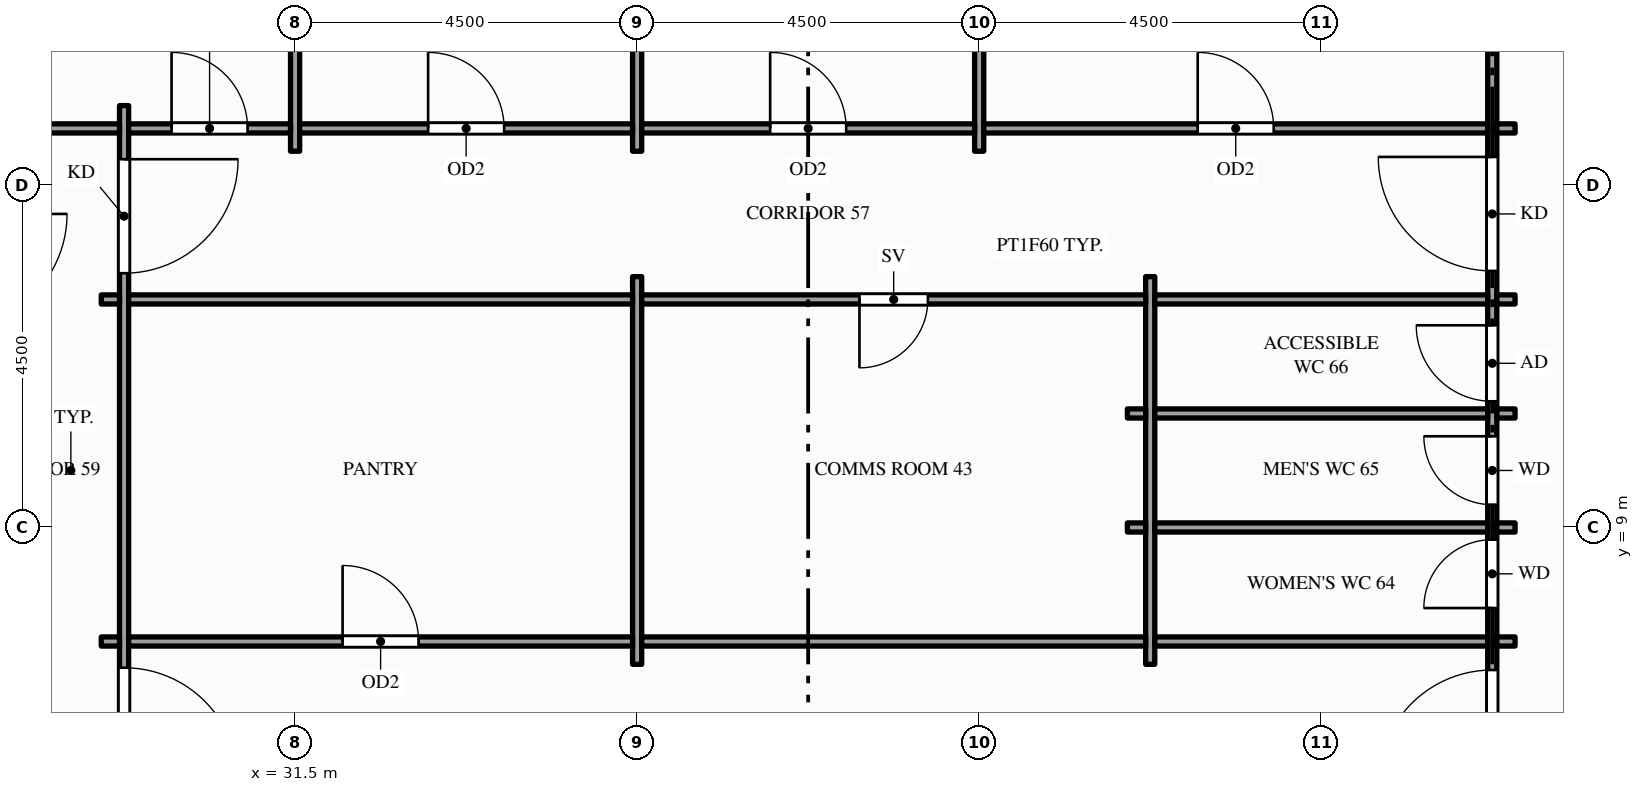
"""IFC4 building model, lengths in metres.
Left out: names, types, materials, properties, quantities, classifications, styles, units other than length and angle.
Written with IfcOpenShell. Run it as: python <this file> out.ifc"""

import sys

from ifc_helpers import new_model, si_unit, direction, frame, frame_2d, origin, place, context, subcontext, project, spatial, rectangle, extrude, element, fill, save


model = new_model("IFC4")
c1 = context("Model", 3, precision=1e-05, world=origin(), true_north=direction((0.0, 1.0)))
c2 = subcontext(c1, "Body", "Model", "MODEL_VIEW")
j1 = project(units=[si_unit("LENGTHUNIT", "METRE"), si_unit("PLANEANGLEUNIT", "RADIAN")], contexts=[c1])
p1 = place(None, origin())
s1 = spatial("IfcSite", under=j1, at=p1, CompositionType="ELEMENT")
p2 = place(p1, origin())
s2 = spatial("IfcBuilding", under=s1, at=p2, CompositionType="ELEMENT")
p3 = place(p2, frame((0.0, 0.0, 211.0)))
s3 = spatial("IfcBuildingStorey", under=s2, at=p3, CompositionType="ELEMENT", Elevation=211.0)
p4 = place(p3, frame((29.25, 4.95, 0.0), z_axis=(0.0, 0.0, 1.0), x_axis=(0.0, 1.0, 0.0)))
e1 = element("IfcWall", 1, at=p4, inside=s3, PredefinedType="PARTITIONING", context=c2, shape_type="SweptSolid", body=[
    extrude(rectangle(XDim=9.6, YDim=0.12, at=frame_2d((4.8, 0.0))), origin(), (0.0, 0.0, 1.0), 2.87),
])
p5 = place(p4, frame((0.705, 0.0, 0.0)))
e2 = element("IfcOpeningElement", 2, at=p5, cuts=e1, PredefinedType="OPENING", context=c2, shape_type="SweptSolid", body=[
    extrude(rectangle(XDim=1.5, YDim=2.1, at=frame_2d((0.75, 1.05))), frame((0.0, 0.07, 0.0), z_axis=(0.0, -1.0, 0.0), x_axis=(1.0, 0.0, 0.0)), (0.0, 0.0, 1.0), 0.14),
])
p6 = place(p4, frame((7.395, 0.0, 0.0)))
e3 = element("IfcOpeningElement", 3, at=p6, cuts=e1, PredefinedType="OPENING", context=c2, shape_type="SweptSolid", body=[
    extrude(rectangle(XDim=1.5, YDim=2.1, at=frame_2d((0.75, 1.05))), frame((0.0, 0.07, 0.0), z_axis=(0.0, -1.0, 0.0), x_axis=(1.0, 0.0, 0.0)), (0.0, 0.0, 1.0), 0.14),
])
p7 = place(p3, frame((31.5, 13.95, 0.0), z_axis=(0.0, 0.0, 1.0), x_axis=(0.0, 1.0, 0.0)))
e4 = element("IfcWall", 4, at=p7, inside=s3, PredefinedType="PARTITIONING", context=c2, shape_type="SweptSolid", body=[
    extrude(rectangle(XDim=6.9, YDim=0.12, at=frame_2d((3.45, 0.0))), origin(), (0.0, 0.0, 1.0), 2.87),
])
p8 = place(p3, frame((36.0, 7.2, 0.0), z_axis=(0.0, 0.0, 1.0), x_axis=(0.0, 1.0, 0.0)))
e5 = element("IfcWall", 5, at=p8, inside=s3, PredefinedType="PARTITIONING", context=c2, shape_type="SweptSolid", body=[
    extrude(rectangle(XDim=5.1, YDim=0.12, at=frame_2d((2.55, 0.0))), origin(), (0.0, 0.0, 1.0), 2.87),
])
for number, where, z_axis, x_axis in (
    (6, (36.0, 13.95, 0.0), (0.0, 0.0, 1.0), (0.0, 1.0, 0.0)),
    (7, (40.5, 13.95, 0.0), (0.0, 0.0, 1.0), (0.0, 1.0, 0.0)),
):
    element("IfcWall", number, at=place(p3, frame(where, z_axis=z_axis, x_axis=x_axis)), inside=s3, PredefinedType="PARTITIONING", context=c2, shape_type="SweptSolid", body=[
        extrude(rectangle(XDim=6.9, YDim=0.12, at=frame_2d((3.45, 0.0))), origin(), (0.0, 0.0, 1.0), 2.87),
    ])
p9 = place(p3, frame((42.75, 7.2, 0.0), z_axis=(0.0, 0.0, 1.0), x_axis=(0.0, 1.0, 0.0)))
e8 = element("IfcWall", 8, at=p9, inside=s3, PredefinedType="PARTITIONING", context=c2, shape_type="SweptSolid", body=[
    extrude(rectangle(XDim=5.1, YDim=0.12, at=frame_2d((2.55, 0.0))), origin(), (0.0, 0.0, 1.0), 2.87),
])
p10 = place(p3, frame((47.25, -1.35, 0.0), z_axis=(0.0, 0.0, 1.0), x_axis=(0.0, 1.0, 0.0)))
e9 = element("IfcWall", 9, at=p10, inside=s3, PredefinedType="PARTITIONING", context=c2, shape_type="SweptSolid", body=[
    extrude(rectangle(XDim=22.2, YDim=0.12, at=frame_2d((11.1, 0.0))), origin(), (0.0, 0.0, 1.0), 2.87),
])
p11 = place(p10, frame((6.975, 0.0, 0.0)))
e10 = element("IfcOpeningElement", 10, at=p11, cuts=e9, PredefinedType="OPENING", context=c2, shape_type="SweptSolid", body=[
    extrude(rectangle(XDim=1.5, YDim=2.1, at=frame_2d((0.75, 1.05))), frame((0.0, 0.07, 0.0), z_axis=(0.0, -1.0, 0.0), x_axis=(1.0, 0.0, 0.0)), (0.0, 0.0, 1.0), 0.14),
])
p12 = place(p10, frame((13.725, 0.0, 0.0)))
e11 = element("IfcOpeningElement", 11, at=p12, cuts=e9, PredefinedType="OPENING", context=c2, shape_type="SweptSolid", body=[
    extrude(rectangle(XDim=1.5, YDim=2.1, at=frame_2d((0.75, 1.05))), frame((0.0, 0.07, 0.0), z_axis=(0.0, -1.0, 0.0), x_axis=(1.0, 0.0, 0.0)), (0.0, 0.0, 1.0), 0.14),
])
p13 = place(p10, frame((9.29, 0.0, 0.0)))
e12 = element("IfcOpeningElement", 12, at=p13, cuts=e9, PredefinedType="OPENING", context=c2, shape_type="SweptSolid", body=[
    extrude(rectangle(XDim=0.9, YDim=2.1, at=frame_2d((0.45, 1.05))), frame((0.0, 0.07, 0.0), z_axis=(0.0, -1.0, 0.0), x_axis=(1.0, 0.0, 0.0)), (0.0, 0.0, 1.0), 0.14),
])
p14 = place(p10, frame((10.65, 0.0, 0.0)))
e13 = element("IfcOpeningElement", 13, at=p14, cuts=e9, PredefinedType="OPENING", context=c2, shape_type="SweptSolid", body=[
    extrude(rectangle(XDim=0.9, YDim=2.1, at=frame_2d((0.45, 1.05))), frame((0.0, 0.07, 0.0), z_axis=(0.0, -1.0, 0.0), x_axis=(1.0, 0.0, 0.0)), (0.0, 0.0, 1.0), 0.14),
])
p15 = place(p10, frame((12.01, 0.0, 0.0)))
e14 = element("IfcOpeningElement", 14, at=p15, cuts=e9, PredefinedType="OPENING", context=c2, shape_type="SweptSolid", body=[
    extrude(rectangle(XDim=1.0, YDim=2.1, at=frame_2d((0.5, 1.05))), frame((0.0, 0.07, 0.0), z_axis=(0.0, -1.0, 0.0), x_axis=(1.0, 0.0, 0.0)), (0.0, 0.0, 1.0), 0.14),
])
p16 = place(p3, frame((28.95, 7.5, 0.0), z_axis=(0.0, 0.0, 1.0), x_axis=(1.0, 0.0, 0.0)))
e15 = element("IfcWall", 15, at=p16, inside=s3, PredefinedType="PARTITIONING", context=c2, shape_type="SweptSolid", body=[
    extrude(rectangle(XDim=0.24, YDim=0.12, at=frame_2d((0.12, 0.0))), origin(), (0.0, 0.0, 1.0), 2.87),
])
p17 = place(p3, frame((29.31, 7.5, 0.0), z_axis=(0.0, 0.0, 1.0), x_axis=(1.0, 0.0, 0.0)))
e16 = element("IfcWall", 16, at=p17, inside=s3, PredefinedType="PARTITIONING", context=c2, shape_type="SweptSolid", body=[
    extrude(rectangle(XDim=6.63, YDim=0.12, at=frame_2d((3.315, 0.0))), origin(), (0.0, 0.0, 1.0), 2.87),
])
p18 = place(p17, frame((2.815, 0.0, 0.0)))
e17 = element("IfcOpeningElement", 17, at=p18, cuts=e16, PredefinedType="OPENING", context=c2, shape_type="SweptSolid", body=[
    extrude(rectangle(XDim=1.0, YDim=2.1, at=frame_2d((0.5, 1.05))), frame((0.0, 0.07, 0.0), z_axis=(0.0, -1.0, 0.0), x_axis=(1.0, 0.0, 0.0)), (0.0, 0.0, 1.0), 0.14),
])
p19 = place(p3, frame((36.06, 7.5, 0.0), z_axis=(0.0, 0.0, 1.0), x_axis=(1.0, 0.0, 0.0)))
e18 = element("IfcWall", 18, at=p19, inside=s3, PredefinedType="PARTITIONING", context=c2, shape_type="SweptSolid", body=[
    extrude(rectangle(XDim=6.63, YDim=0.12, at=frame_2d((3.315, 0.0))), origin(), (0.0, 0.0, 1.0), 2.87),
])
p20 = place(p3, frame((42.81, 7.5, 0.0), z_axis=(0.0, 0.0, 1.0), x_axis=(1.0, 0.0, 0.0)))
e19 = element("IfcWall", 19, at=p20, inside=s3, PredefinedType="PARTITIONING", context=c2, shape_type="SweptSolid", body=[
    extrude(rectangle(XDim=4.38, YDim=0.12, at=frame_2d((2.19, 0.0))), origin(), (0.0, 0.0, 1.0), 2.87),
])
for number, where, z_axis, x_axis in (
    (20, (47.31, 7.5, 0.0), (0.0, 0.0, 1.0), (1.0, 0.0, 0.0)),
    (21, (42.45, 9.0, 0.0), (0.0, 0.0, 1.0), (1.0, 0.0, 0.0)),
):
    element("IfcWall", number, at=place(p3, frame(where, z_axis=z_axis, x_axis=x_axis)), inside=s3, PredefinedType="PARTITIONING", context=c2, shape_type="SweptSolid", body=[
        extrude(rectangle(XDim=0.24, YDim=0.12, at=frame_2d((0.12, 0.0))), origin(), (0.0, 0.0, 1.0), 2.87),
    ])
p21 = place(p3, frame((42.81, 9.0, 0.0), z_axis=(0.0, 0.0, 1.0), x_axis=(1.0, 0.0, 0.0)))
e22 = element("IfcWall", 22, at=p21, inside=s3, PredefinedType="PARTITIONING", context=c2, shape_type="SweptSolid", body=[
    extrude(rectangle(XDim=4.38, YDim=0.12, at=frame_2d((2.19, 0.0))), origin(), (0.0, 0.0, 1.0), 2.87),
])
for number, where, z_axis, x_axis in (
    (23, (47.31, 9.0, 0.0), (0.0, 0.0, 1.0), (1.0, 0.0, 0.0)),
    (24, (42.45, 10.5, 0.0), (0.0, 0.0, 1.0), (1.0, 0.0, 0.0)),
):
    element("IfcWall", number, at=place(p3, frame(where, z_axis=z_axis, x_axis=x_axis)), inside=s3, PredefinedType="PARTITIONING", context=c2, shape_type="SweptSolid", body=[
        extrude(rectangle(XDim=0.24, YDim=0.12, at=frame_2d((0.12, 0.0))), origin(), (0.0, 0.0, 1.0), 2.87),
    ])
p22 = place(p3, frame((42.81, 10.5, 0.0), z_axis=(0.0, 0.0, 1.0), x_axis=(1.0, 0.0, 0.0)))
e25 = element("IfcWall", 25, at=p22, inside=s3, PredefinedType="PARTITIONING", context=c2, shape_type="SweptSolid", body=[
    extrude(rectangle(XDim=4.38, YDim=0.12, at=frame_2d((2.19, 0.0))), origin(), (0.0, 0.0, 1.0), 2.87),
])
for number, where, z_axis, x_axis in (
    (26, (47.31, 10.5, 0.0), (0.0, 0.0, 1.0), (1.0, 0.0, 0.0)),
    (27, (28.95, 12.0, 0.0), (0.0, 0.0, 1.0), (1.0, 0.0, 0.0)),
):
    element("IfcWall", number, at=place(p3, frame(where, z_axis=z_axis, x_axis=x_axis)), inside=s3, PredefinedType="PARTITIONING", context=c2, shape_type="SweptSolid", body=[
        extrude(rectangle(XDim=0.24, YDim=0.12, at=frame_2d((0.12, 0.0))), origin(), (0.0, 0.0, 1.0), 2.87),
    ])
p23 = place(p3, frame((29.31, 12.0, 0.0), z_axis=(0.0, 0.0, 1.0), x_axis=(1.0, 0.0, 0.0)))
e28 = element("IfcWall", 28, at=p23, inside=s3, PredefinedType="PARTITIONING", context=c2, shape_type="SweptSolid", body=[
    extrude(rectangle(XDim=6.63, YDim=0.12, at=frame_2d((3.315, 0.0))), origin(), (0.0, 0.0, 1.0), 2.87),
])
p24 = place(p3, frame((36.06, 12.0, 0.0), z_axis=(0.0, 0.0, 1.0), x_axis=(1.0, 0.0, 0.0)))
e29 = element("IfcWall", 29, at=p24, inside=s3, PredefinedType="PARTITIONING", context=c2, shape_type="SweptSolid", body=[
    extrude(rectangle(XDim=6.63, YDim=0.12, at=frame_2d((3.315, 0.0))), origin(), (0.0, 0.0, 1.0), 2.87),
])
p25 = place(p24, frame((2.865, 0.0, 0.0)))
e30 = element("IfcOpeningElement", 30, at=p25, cuts=e29, PredefinedType="OPENING", context=c2, shape_type="SweptSolid", body=[
    extrude(rectangle(XDim=0.9, YDim=2.1, at=frame_2d((0.45, 1.05))), frame((0.0, 0.07, 0.0), z_axis=(0.0, -1.0, 0.0), x_axis=(1.0, 0.0, 0.0)), (0.0, 0.0, 1.0), 0.14),
])
p26 = place(p3, frame((42.81, 12.0, 0.0), z_axis=(0.0, 0.0, 1.0), x_axis=(1.0, 0.0, 0.0)))
e31 = element("IfcWall", 31, at=p26, inside=s3, PredefinedType="PARTITIONING", context=c2, shape_type="SweptSolid", body=[
    extrude(rectangle(XDim=4.38, YDim=0.12, at=frame_2d((2.19, 0.0))), origin(), (0.0, 0.0, 1.0), 2.87),
])
p27 = place(p3, frame((47.31, 12.0, 0.0), z_axis=(0.0, 0.0, 1.0), x_axis=(1.0, 0.0, 0.0)))
e32 = element("IfcWall", 32, at=p27, inside=s3, PredefinedType="PARTITIONING", context=c2, shape_type="SweptSolid", body=[
    extrude(rectangle(XDim=0.24, YDim=0.12, at=frame_2d((0.12, 0.0))), origin(), (0.0, 0.0, 1.0), 2.87),
])
p28 = place(p3, frame((27.06, 14.25, 0.0), z_axis=(0.0, 0.0, 1.0), x_axis=(1.0, 0.0, 0.0)))
e33 = element("IfcWall", 33, at=p28, inside=s3, PredefinedType="PARTITIONING", context=c2, shape_type="SweptSolid", body=[
    extrude(rectangle(XDim=2.13, YDim=0.12, at=frame_2d((1.065, 0.0))), origin(), (0.0, 0.0, 1.0), 2.87),
])
p29 = place(p3, frame((29.31, 14.25, 0.0), z_axis=(0.0, 0.0, 1.0), x_axis=(1.0, 0.0, 0.0)))
e34 = element("IfcWall", 34, at=p29, inside=s3, PredefinedType="PARTITIONING", context=c2, shape_type="SweptSolid", body=[
    extrude(rectangle(XDim=2.13, YDim=0.12, at=frame_2d((1.065, 0.0))), origin(), (0.0, 0.0, 1.0), 2.87),
])
p30 = place(p29, frame((0.565, 0.0, 0.0)))
e35 = element("IfcOpeningElement", 35, at=p30, cuts=e34, PredefinedType="OPENING", context=c2, shape_type="SweptSolid", body=[
    extrude(rectangle(XDim=1.0, YDim=2.1, at=frame_2d((0.5, 1.05))), frame((0.0, 0.07, 0.0), z_axis=(0.0, -1.0, 0.0), x_axis=(1.0, 0.0, 0.0)), (0.0, 0.0, 1.0), 0.14),
])
p31 = place(p3, frame((31.56, 14.25, 0.0), z_axis=(0.0, 0.0, 1.0), x_axis=(1.0, 0.0, 0.0)))
e36 = element("IfcWall", 36, at=p31, inside=s3, PredefinedType="PARTITIONING", context=c2, shape_type="SweptSolid", body=[
    extrude(rectangle(XDim=4.38, YDim=0.12, at=frame_2d((2.19, 0.0))), origin(), (0.0, 0.0, 1.0), 2.87),
])
p32 = place(p31, frame((1.69, 0.0, 0.0)))
e37 = element("IfcOpeningElement", 37, at=p32, cuts=e36, PredefinedType="OPENING", context=c2, shape_type="SweptSolid", body=[
    extrude(rectangle(XDim=1.0, YDim=2.1, at=frame_2d((0.5, 1.05))), frame((0.0, 0.07, 0.0), z_axis=(0.0, -1.0, 0.0), x_axis=(1.0, 0.0, 0.0)), (0.0, 0.0, 1.0), 0.14),
])
p33 = place(p3, frame((36.06, 14.25, 0.0), z_axis=(0.0, 0.0, 1.0), x_axis=(1.0, 0.0, 0.0)))
e38 = element("IfcWall", 38, at=p33, inside=s3, PredefinedType="PARTITIONING", context=c2, shape_type="SweptSolid", body=[
    extrude(rectangle(XDim=4.38, YDim=0.12, at=frame_2d((2.19, 0.0))), origin(), (0.0, 0.0, 1.0), 2.87),
])
p34 = place(p33, frame((1.69, 0.0, 0.0)))
e39 = element("IfcOpeningElement", 39, at=p34, cuts=e38, PredefinedType="OPENING", context=c2, shape_type="SweptSolid", body=[
    extrude(rectangle(XDim=1.0, YDim=2.1, at=frame_2d((0.5, 1.05))), frame((0.0, 0.07, 0.0), z_axis=(0.0, -1.0, 0.0), x_axis=(1.0, 0.0, 0.0)), (0.0, 0.0, 1.0), 0.14),
])
p35 = place(p3, frame((40.56, 14.25, 0.0), z_axis=(0.0, 0.0, 1.0), x_axis=(1.0, 0.0, 0.0)))
e40 = element("IfcWall", 40, at=p35, inside=s3, PredefinedType="PARTITIONING", context=c2, shape_type="SweptSolid", body=[
    extrude(rectangle(XDim=6.63, YDim=0.12, at=frame_2d((3.315, 0.0))), origin(), (0.0, 0.0, 1.0), 2.87),
])
p36 = place(p35, frame((2.815, 0.0, 0.0)))
e41 = element("IfcOpeningElement", 41, at=p36, cuts=e40, PredefinedType="OPENING", context=c2, shape_type="SweptSolid", body=[
    extrude(rectangle(XDim=1.0, YDim=2.1, at=frame_2d((0.5, 1.05))), frame((0.0, 0.07, 0.0), z_axis=(0.0, -1.0, 0.0), x_axis=(1.0, 0.0, 0.0)), (0.0, 0.0, 1.0), 0.14),
])
p37 = place(p3, frame((47.31, 14.25, 0.0), z_axis=(0.0, 0.0, 1.0), x_axis=(1.0, 0.0, 0.0)))
e42 = element("IfcWall", 42, at=p37, inside=s3, PredefinedType="PARTITIONING", context=c2, shape_type="SweptSolid", body=[
    extrude(rectangle(XDim=0.24, YDim=0.12, at=frame_2d((0.12, 0.0))), origin(), (0.0, 0.0, 1.0), 2.87),
])
p38 = place(p5, origin())
e43 = element("IfcDoor", 43, at=p38, inside=s3, OperationType="SINGLE_SWING_LEFT", PredefinedType="DOOR", context=c2, shape_type="SweptSolid", body=[
    extrude(rectangle(XDim=1.5, YDim=2.1, at=frame_2d((0.75, 1.05))), frame((0.0, 0.025, 0.0), z_axis=(0.0, -1.0, 0.0), x_axis=(1.0, 0.0, 0.0)), (0.0, 0.0, 1.0), 0.05),
])
fill(e2, e43)
p39 = place(p6, origin())
e44 = element("IfcDoor", 44, at=p39, inside=s3, OperationType="SINGLE_SWING_RIGHT", PredefinedType="DOOR", context=c2, shape_type="SweptSolid", body=[
    extrude(rectangle(XDim=1.5, YDim=2.1, at=frame_2d((0.75, 1.05))), frame((0.0, 0.025, 0.0), z_axis=(0.0, -1.0, 0.0), x_axis=(1.0, 0.0, 0.0)), (0.0, 0.0, 1.0), 0.05),
])
fill(e3, e44)
p40 = place(p11, origin())
e45 = element("IfcDoor", 45, at=p40, inside=s3, OperationType="SINGLE_SWING_LEFT", PredefinedType="DOOR", context=c2, shape_type="SweptSolid", body=[
    extrude(rectangle(XDim=1.5, YDim=2.1, at=frame_2d((0.75, 1.05))), frame((0.0, 0.025, 0.0), z_axis=(0.0, -1.0, 0.0), x_axis=(1.0, 0.0, 0.0)), (0.0, 0.0, 1.0), 0.05),
])
fill(e10, e45)
p41 = place(p12, origin())
e46 = element("IfcDoor", 46, at=p41, inside=s3, OperationType="SINGLE_SWING_RIGHT", PredefinedType="DOOR", context=c2, shape_type="SweptSolid", body=[
    extrude(rectangle(XDim=1.5, YDim=2.1, at=frame_2d((0.75, 1.05))), frame((0.0, 0.025, 0.0), z_axis=(0.0, -1.0, 0.0), x_axis=(1.0, 0.0, 0.0)), (0.0, 0.0, 1.0), 0.05),
])
fill(e11, e46)
p42 = place(p18, origin())
e47 = element("IfcDoor", 47, at=p42, inside=s3, OperationType="SINGLE_SWING_LEFT", PredefinedType="DOOR", context=c2, shape_type="SweptSolid", body=[
    extrude(rectangle(XDim=1.0, YDim=2.1, at=frame_2d((0.5, 1.05))), frame((0.0, 0.025, 0.0), z_axis=(0.0, -1.0, 0.0), x_axis=(1.0, 0.0, 0.0)), (0.0, 0.0, 1.0), 0.05),
])
fill(e17, e47)
p43 = place(p25, origin())
e48 = element("IfcDoor", 48, at=p43, inside=s3, OperationType="SINGLE_SWING_LEFT", PredefinedType="DOOR", context=c2, shape_type="SweptSolid", body=[
    extrude(rectangle(XDim=0.9, YDim=2.1, at=frame_2d((0.45, 1.05))), frame((0.0, 0.025, 0.0), z_axis=(0.0, -1.0, 0.0), x_axis=(1.0, 0.0, 0.0)), (0.0, 0.0, 1.0), 0.05),
])
fill(e30, e48)
p44 = place(p13, origin())
e49 = element("IfcDoor", 49, at=p44, inside=s3, OperationType="SINGLE_SWING_LEFT", PredefinedType="DOOR", context=c2, shape_type="SweptSolid", body=[
    extrude(rectangle(XDim=0.9, YDim=2.1, at=frame_2d((0.45, 1.05))), frame((0.0, 0.025, 0.0), z_axis=(0.0, -1.0, 0.0), x_axis=(1.0, 0.0, 0.0)), (0.0, 0.0, 1.0), 0.05),
])
fill(e12, e49)
p45 = place(p14, origin())
e50 = element("IfcDoor", 50, at=p45, inside=s3, OperationType="SINGLE_SWING_RIGHT", PredefinedType="DOOR", context=c2, shape_type="SweptSolid", body=[
    extrude(rectangle(XDim=0.9, YDim=2.1, at=frame_2d((0.45, 1.05))), frame((0.0, 0.025, 0.0), z_axis=(0.0, -1.0, 0.0), x_axis=(1.0, 0.0, 0.0)), (0.0, 0.0, 1.0), 0.05),
])
fill(e13, e50)
p46 = place(p15, origin())
e51 = element("IfcDoor", 51, at=p46, inside=s3, OperationType="SINGLE_SWING_RIGHT", PredefinedType="DOOR", context=c2, shape_type="SweptSolid", body=[
    extrude(rectangle(XDim=1.0, YDim=2.1, at=frame_2d((0.5, 1.05))), frame((0.0, 0.025, 0.0), z_axis=(0.0, -1.0, 0.0), x_axis=(1.0, 0.0, 0.0)), (0.0, 0.0, 1.0), 0.05),
])
fill(e14, e51)
p47 = place(p30, origin())
e52 = element("IfcDoor", 52, at=p47, inside=s3, OperationType="SINGLE_SWING_LEFT", PredefinedType="DOOR", context=c2, shape_type="SweptSolid", body=[
    extrude(rectangle(XDim=1.0, YDim=2.1, at=frame_2d((0.5, 1.05))), frame((0.0, 0.025, 0.0), z_axis=(0.0, -1.0, 0.0), x_axis=(1.0, 0.0, 0.0)), (0.0, 0.0, 1.0), 0.05),
])
fill(e35, e52)
p48 = place(p32, origin())
e53 = element("IfcDoor", 53, at=p48, inside=s3, OperationType="SINGLE_SWING_LEFT", PredefinedType="DOOR", context=c2, shape_type="SweptSolid", body=[
    extrude(rectangle(XDim=1.0, YDim=2.1, at=frame_2d((0.5, 1.05))), frame((0.0, 0.025, 0.0), z_axis=(0.0, -1.0, 0.0), x_axis=(1.0, 0.0, 0.0)), (0.0, 0.0, 1.0), 0.05),
])
fill(e37, e53)
p49 = place(p34, origin())
e54 = element("IfcDoor", 54, at=p49, inside=s3, OperationType="SINGLE_SWING_LEFT", PredefinedType="DOOR", context=c2, shape_type="SweptSolid", body=[
    extrude(rectangle(XDim=1.0, YDim=2.1, at=frame_2d((0.5, 1.05))), frame((0.0, 0.025, 0.0), z_axis=(0.0, -1.0, 0.0), x_axis=(1.0, 0.0, 0.0)), (0.0, 0.0, 1.0), 0.05),
])
fill(e39, e54)
p50 = place(p36, origin())
e55 = element("IfcDoor", 55, at=p50, inside=s3, OperationType="SINGLE_SWING_LEFT", PredefinedType="DOOR", context=c2, shape_type="SweptSolid", body=[
    extrude(rectangle(XDim=1.0, YDim=2.1, at=frame_2d((0.5, 1.05))), frame((0.0, 0.025, 0.0), z_axis=(0.0, -1.0, 0.0), x_axis=(1.0, 0.0, 0.0)), (0.0, 0.0, 1.0), 0.05),
])
fill(e41, e55)
save(model, sys.argv[1])
